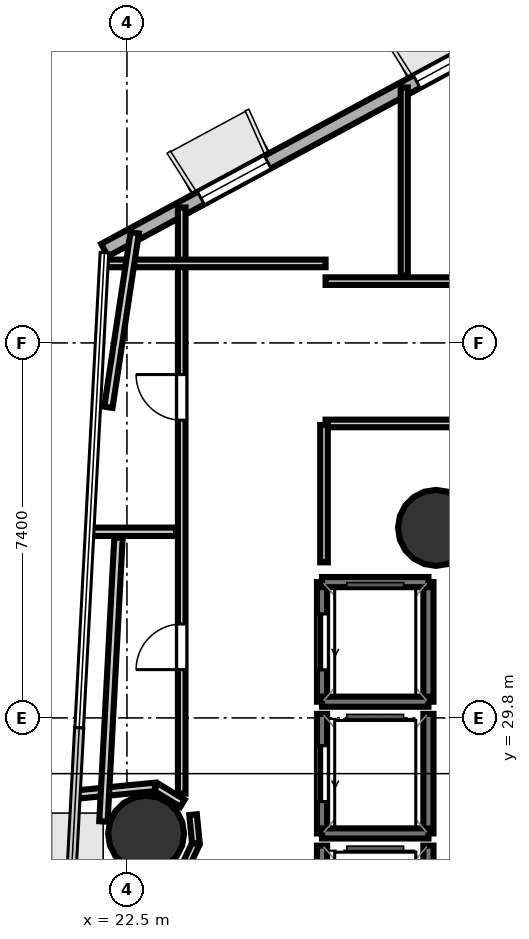
"""IFC4 building model, lengths in metres.
Left out: names, types, materials, properties, quantities, classifications, styles, units other than length and angle.
Written with IfcOpenShell. Run it as: python <this file> out.ifc"""

import sys

from ifc_helpers import new_model, si_unit, direction, frame, frame_2d, origin, origin_2d, place, context, subcontext, project, spatial, rectangle, hollow_circle, extrude, element, fill, save


model = new_model("IFC4")
c1 = context("Model", 3, precision=1e-05, world=origin(), true_north=direction((0.0, 1.0)))
c2 = subcontext(c1, "Body", "Model", "MODEL_VIEW")
j1 = project(units=[si_unit("LENGTHUNIT", "METRE"), si_unit("PLANEANGLEUNIT", "RADIAN")], contexts=[c1])
p1 = place(None, origin())
s1 = spatial("IfcSite", under=j1, at=p1, CompositionType="ELEMENT")
p2 = place(p1, origin())
s2 = spatial("IfcBuilding", under=s1, at=p2, CompositionType="ELEMENT")
p3 = place(p2, frame((0.0, 0.0, 131.1)))
s3 = spatial("IfcBuildingStorey", under=s2, at=p3, CompositionType="ELEMENT", Elevation=131.1)
for number, where, z_axis, x_axis in (
    (1, (28.6, 33.55, 0.0), (0.0, 0.0, 1.0), (1.0, 0.0, 0.0)),
    (2, (22.878, 27.516, 0.0), (0.0, 0.0, 1.0), (1.0, 0.0, 0.0)),
):
    element("IfcColumn", number, at=place(p3, frame(where, z_axis=z_axis, x_axis=x_axis)), inside=s3, PredefinedType="COLUMN", context=c2, shape_type="SweptSolid", body=[
        extrude(hollow_circle(Radius=0.75, WallThickness=0.036, at=origin_2d()), origin(), (0.0, 0.0, 1.0), 3.7),
    ])
p4 = place(p3, frame((30.594, 43.637, 0.0), z_axis=(0.0, 0.0, 1.0), x_axis=(-0.880090959545, -0.474805120999, 0.0)))
e3 = element("IfcWall", 3, at=p4, inside=s3, PredefinedType="SOLIDWALL", context=c2, shape_type="SweptSolid", body=[
    extrude(rectangle(XDim=9.7, YDim=0.28, at=frame_2d((4.85, 0.0))), origin(), (0.0, 0.0, 1.0), 3.52),
])
p5 = place(p4, frame((1.2, 0.0, 0.85)))
e4 = element("IfcOpeningElement", 4, at=p5, cuts=e3, PredefinedType="OPENING", context=c2, shape_type="SweptSolid", body=[
    extrude(rectangle(XDim=1.5, YDim=2.1, at=frame_2d((0.75, 1.05))), frame((0.0, 0.15, 0.0), z_axis=(0.0, -1.0, 0.0), x_axis=(1.0, 0.0, 0.0)), (0.0, 0.0, 1.0), 0.3),
])
p6 = place(p4, frame((6.04, 0.0, 0.85)))
e5 = element("IfcOpeningElement", 5, at=p6, cuts=e3, PredefinedType="OPENING", context=c2, shape_type="SweptSolid", body=[
    extrude(rectangle(XDim=1.5, YDim=2.1, at=frame_2d((0.75, 1.05))), frame((0.0, 0.15, 0.0), z_axis=(0.0, -1.0, 0.0), x_axis=(1.0, 0.0, 0.0)), (0.0, 0.0, 1.0), 0.3),
])
p7 = place(p3, frame((28.45, 30.12, 0.0), z_axis=(0.0, 0.0, 1.0), x_axis=(0.0, 1.0, 0.0)))
e6 = element("IfcWall", 6, at=p7, inside=s3, PredefinedType="SOLIDWALL", context=c2, shape_type="SweptSolid", body=[
    extrude(rectangle(XDim=2.36, YDim=0.2, at=frame_2d((1.18, 0.0))), origin(), (0.0, 0.0, 1.0), 3.52),
])
p8 = place(p3, frame((26.35, 30.12, 0.0), z_axis=(0.0, 0.0, 1.0), x_axis=(0.0, 1.0, 0.0)))
e7 = element("IfcWall", 7, at=p8, inside=s3, PredefinedType="SOLIDWALL", context=c2, shape_type="SweptSolid", body=[
    extrude(rectangle(XDim=2.36, YDim=0.2, at=frame_2d((1.18, 0.0))), origin(), (0.0, 0.0, 1.0), 3.52),
])
p9 = place(p8, frame((0.63, 0.0, 0.0)))
e8 = element("IfcOpeningElement", 8, at=p9, cuts=e7, PredefinedType="OPENING", context=c2, shape_type="SweptSolid", body=[
    extrude(rectangle(XDim=1.1, YDim=2.15, at=frame_2d((0.55, 1.075))), frame((0.0, 0.11, 0.0), z_axis=(0.0, -1.0, 0.0), x_axis=(1.0, 0.0, 0.0)), (0.0, 0.0, 1.0), 0.22),
])
for number, where, z_axis, x_axis in (
    (9, (26.35, 32.48, 0.0), (0.0, 0.0, 1.0), (1.0, 0.0, 0.0)),
    (10, (26.35, 30.12, 0.0), (0.0, 0.0, 1.0), (1.0, 0.0, 0.0)),
):
    element("IfcWall", number, at=place(p3, frame(where, z_axis=z_axis, x_axis=x_axis)), inside=s3, PredefinedType="SOLIDWALL", context=c2, shape_type="SweptSolid", body=[
        extrude(rectangle(XDim=2.1, YDim=0.2, at=frame_2d((1.05, 0.0))), origin(), (0.0, 0.0, 1.0), 3.52),
    ])
p10 = place(p3, frame((28.45, 27.52, 0.0), z_axis=(0.0, 0.0, 1.0), x_axis=(0.0, 1.0, 0.0)))
e11 = element("IfcWall", 11, at=p10, inside=s3, PredefinedType="SOLIDWALL", context=c2, shape_type="SweptSolid", body=[
    extrude(rectangle(XDim=2.36, YDim=0.2, at=frame_2d((1.18, 0.0))), origin(), (0.0, 0.0, 1.0), 3.52),
])
p11 = place(p3, frame((26.35, 27.52, 0.0), z_axis=(0.0, 0.0, 1.0), x_axis=(0.0, 1.0, 0.0)))
e12 = element("IfcWall", 12, at=p11, inside=s3, PredefinedType="SOLIDWALL", context=c2, shape_type="SweptSolid", body=[
    extrude(rectangle(XDim=2.36, YDim=0.2, at=frame_2d((1.18, 0.0))), origin(), (0.0, 0.0, 1.0), 3.52),
])
p12 = place(p11, frame((0.63, 0.0, 0.0)))
e13 = element("IfcOpeningElement", 13, at=p12, cuts=e12, PredefinedType="OPENING", context=c2, shape_type="SweptSolid", body=[
    extrude(rectangle(XDim=1.1, YDim=2.15, at=frame_2d((0.55, 1.075))), frame((0.0, 0.11, 0.0), z_axis=(0.0, -1.0, 0.0), x_axis=(1.0, 0.0, 0.0)), (0.0, 0.0, 1.0), 0.22),
])
p13 = place(p3, frame((26.35, 27.52, 0.0), z_axis=(0.0, 0.0, 1.0), x_axis=(1.0, 0.0, 0.0)))
e14 = element("IfcWall", 14, at=p13, inside=s3, PredefinedType="SOLIDWALL", context=c2, shape_type="SweptSolid", body=[
    extrude(rectangle(XDim=2.1, YDim=0.2, at=frame_2d((1.05, 0.0))), origin(), (0.0, 0.0, 1.0), 3.52),
])
p14 = place(p3, frame((28.45, 24.92, 0.0), z_axis=(0.0, 0.0, 1.0), x_axis=(0.0, 1.0, 0.0)))
e15 = element("IfcWall", 15, at=p14, inside=s3, PredefinedType="SOLIDWALL", context=c2, shape_type="SweptSolid", body=[
    extrude(rectangle(XDim=2.36, YDim=0.2, at=frame_2d((1.18, 0.0))), origin(), (0.0, 0.0, 1.0), 3.52),
])
p15 = place(p3, frame((26.35, 24.92, 0.0), z_axis=(0.0, 0.0, 1.0), x_axis=(0.0, 1.0, 0.0)))
e16 = element("IfcWall", 16, at=p15, inside=s3, PredefinedType="SOLIDWALL", context=c2, shape_type="SweptSolid", body=[
    extrude(rectangle(XDim=2.36, YDim=0.2, at=frame_2d((1.18, 0.0))), origin(), (0.0, 0.0, 1.0), 3.52),
])
p16 = place(p15, frame((0.63, 0.0, 0.0)))
e17 = element("IfcOpeningElement", 17, at=p16, cuts=e16, PredefinedType="OPENING", context=c2, shape_type="SweptSolid", body=[
    extrude(rectangle(XDim=1.1, YDim=2.15, at=frame_2d((0.55, 1.075))), frame((0.0, 0.11, 0.0), z_axis=(0.0, -1.0, 0.0), x_axis=(1.0, 0.0, 0.0)), (0.0, 0.0, 1.0), 0.22),
])
p17 = place(p3, frame((23.581, 28.307, 0.0), z_axis=(0.0, 0.0, 1.0), x_axis=(0.0, 1.0, 0.0)))
e18 = element("IfcWall", 18, at=p17, inside=s3, PredefinedType="PARTITIONING", context=c2, shape_type="SweptSolid", body=[
    extrude(rectangle(XDim=11.567, YDim=0.15, at=frame_2d((5.783, 0.0))), origin(), (0.0, 0.0, 1.0), 2.84),
])
p18 = place(p17, frame((7.369, 0.0, 0.0)))
e19 = element("IfcOpeningElement", 19, at=p18, cuts=e18, PredefinedType="OPENING", context=c2, shape_type="SweptSolid", body=[
    extrude(rectangle(XDim=0.9, YDim=2.1, at=frame_2d((0.45, 1.05))), frame((0.0, 0.085, 0.0), z_axis=(0.0, -1.0, 0.0), x_axis=(1.0, 0.0, 0.0)), (0.0, 0.0, 1.0), 0.17),
])
p19 = place(p17, frame((2.446, 0.0, 0.0)))
e20 = element("IfcOpeningElement", 20, at=p19, cuts=e18, PredefinedType="OPENING", context=c2, shape_type="SweptSolid", body=[
    extrude(rectangle(XDim=0.9, YDim=2.1, at=frame_2d((0.45, 1.05))), frame((0.0, 0.085, 0.0), z_axis=(0.0, -1.0, 0.0), x_axis=(1.0, 0.0, 0.0)), (0.0, 0.0, 1.0), 0.17),
])
p20 = place(p3, frame((22.024, 38.769, 0.0), z_axis=(0.0, 0.0, 1.0), x_axis=(1.0, 0.0, 0.0)))
e21 = element("IfcWall", 21, at=p20, inside=s3, PredefinedType="PARTITIONING", context=c2, shape_type="SweptSolid", body=[
    extrude(rectangle(XDim=4.396, YDim=0.15, at=frame_2d((2.198, 0.0))), origin(), (0.0, 0.0, 1.0), 2.84),
])
p21 = place(p3, frame((26.42, 38.419, 0.0), z_axis=(0.0, 0.0, 1.0), x_axis=(1.0, 0.0, 0.0)))
e22 = element("IfcWall", 22, at=p21, inside=s3, PredefinedType="PARTITIONING", context=c2, shape_type="SweptSolid", body=[
    extrude(rectangle(XDim=14.264, YDim=0.15, at=frame_2d((7.132, 0.0))), origin(), (0.0, 0.0, 1.0), 2.84),
])
p22 = place(p21, frame((6.559, 0.0, 0.0)))
e23 = element("IfcOpeningElement", 23, at=p22, cuts=e22, PredefinedType="OPENING", context=c2, shape_type="SweptSolid", body=[
    extrude(rectangle(XDim=1.25, YDim=2.2, at=frame_2d((0.625, 1.1))), frame((0.0, 0.085, 0.0), z_axis=(0.0, -1.0, 0.0), x_axis=(1.0, 0.0, 0.0)), (0.0, 0.0, 1.0), 0.17),
])
p23 = place(p3, frame((29.7, 35.611, 0.0), z_axis=(0.0, 0.0, 1.0), x_axis=(-1.0, 0.0, 0.0)))
e24 = element("IfcWall", 24, at=p23, inside=s3, PredefinedType="PARTITIONING", context=c2, shape_type="SweptSolid", body=[
    extrude(rectangle(XDim=3.28, YDim=0.15, at=frame_2d((1.64, 0.0))), origin(), (0.0, 0.0, 1.0), 2.84),
])
p24 = place(p3, frame((26.389, 35.58, 0.0), z_axis=(0.0, 0.0, 1.0), x_axis=(0.0, -1.0, 0.0)))
e25 = element("IfcWall", 25, at=p24, inside=s3, PredefinedType="PARTITIONING", context=c2, shape_type="SweptSolid", body=[
    extrude(rectangle(XDim=2.71, YDim=0.15, at=frame_2d((1.355, 0.0))), origin(), (0.0, 0.0, 1.0), 2.84),
])
p25 = place(p3, frame((23.578, 26.712, 0.0), z_axis=(0.0, 0.0, 1.0), x_axis=(0.421251946418, 0.906943657367, 0.0)))
e26 = element("IfcWall", 26, at=p25, inside=s3, PredefinedType="PARTITIONING", context=c2, shape_type="SweptSolid", body=[
    extrude(rectangle(XDim=0.663, YDim=0.15, at=frame_2d((0.332, 0.0))), origin(), (0.0, 0.0, 1.0), 2.84),
])
p26 = place(p3, frame((23.86, 27.33, 0.0), z_axis=(0.0, 0.0, 1.0), x_axis=(-0.098000919071, 0.995186324193, 0.0)))
e27 = element("IfcWall", 27, at=p26, inside=s3, PredefinedType="PARTITIONING", context=c2, shape_type="SweptSolid", body=[
    extrude(rectangle(XDim=0.563, YDim=0.15, at=frame_2d((0.281, 0.0))), origin(), (0.0, 0.0, 1.0), 2.84),
])
p27 = place(p3, frame((27.973, 38.53, 0.0), z_axis=(0.0, 0.0, 1.0), x_axis=(0.0, 1.0, 0.0)))
e28 = element("IfcWall", 28, at=p27, inside=s3, PredefinedType="PARTITIONING", context=c2, shape_type="SweptSolid", body=[
    extrude(rectangle(XDim=3.713, YDim=0.14, at=frame_2d((1.856, 0.0))), origin(), (0.0, 0.0, 1.0), 2.84),
])
p28 = place(p3, frame((23.47, 33.473, 0.0), z_axis=(0.0, 0.0, 1.0), x_axis=(-1.0, 0.0, 0.0)))
e29 = element("IfcWall", 29, at=p28, inside=s3, PredefinedType="PLUMBINGWALL", context=c2, shape_type="SweptSolid", body=[
    extrude(rectangle(XDim=1.727, YDim=0.165, at=frame_2d((0.864, 0.0))), origin(), (0.0, 0.0, 1.0), 2.84),
])
p29 = place(p3, frame((22.134, 35.929, 0.0), z_axis=(0.0, 0.0, 1.0), x_axis=(0.14915308323, 0.988814116891, 0.0)))
e30 = element("IfcWall", 30, at=p29, inside=s3, PredefinedType="PLUMBINGWALL", context=c2, shape_type="SweptSolid", body=[
    extrude(rectangle(XDim=3.482, YDim=0.165, at=frame_2d((1.741, 0.0))), origin(), (0.0, 0.0, 1.0), 2.84),
])
p30 = place(p3, frame((23.595, 28.116, 0.0), z_axis=(0.0, 0.0, 1.0), x_axis=(-0.853675286084, 0.520805631622, 0.0)))
e31 = element("IfcWall", 31, at=p30, inside=s3, PredefinedType="PLUMBINGWALL", context=c2, shape_type="SweptSolid", body=[
    extrude(rectangle(XDim=0.613, YDim=0.165, at=frame_2d((0.307, 0.0))), origin(), (0.0, 0.0, 1.0), 2.84),
])
p31 = place(p3, frame((23.052, 28.439, 0.0), z_axis=(0.0, 0.0, 1.0), x_axis=(-0.995177318494, -0.098092327712, 0.0)))
e32 = element("IfcWall", 32, at=p31, inside=s3, PredefinedType="PLUMBINGWALL", context=c2, shape_type="SweptSolid", body=[
    extrude(rectangle(XDim=1.593, YDim=0.165, at=frame_2d((0.796, 0.0))), origin(), (0.0, 0.0, 1.0), 2.84),
])
p32 = place(p3, frame((22.036, 27.756, 0.0), z_axis=(0.0, 0.0, 1.0), x_axis=(0.053022653613, 0.998593309713, 0.0)))
e33 = element("IfcWall", 33, at=p32, inside=s3, PredefinedType="PLUMBINGWALL", context=c2, shape_type="SweptSolid", body=[
    extrude(rectangle(XDim=5.608, YDim=0.165, at=frame_2d((2.804, 0.0))), origin(), (0.0, 0.0, 1.0), 2.84),
])
p33 = place(p9, origin())
e34 = element("IfcDoor", 34, at=p33, inside=s3, OperationType="SLIDING_TO_LEFT", PredefinedType="DOOR", context=c2, shape_type="SweptSolid", body=[
    extrude(rectangle(XDim=1.1, YDim=2.15, at=frame_2d((0.55, 1.075))), frame((0.0, 0.025, 0.0), z_axis=(0.0, -1.0, 0.0), x_axis=(1.0, 0.0, 0.0)), (0.0, 0.0, 1.0), 0.05),
])
fill(e8, e34)
p34 = place(p12, origin())
e35 = element("IfcDoor", 35, at=p34, inside=s3, OperationType="SLIDING_TO_LEFT", PredefinedType="DOOR", context=c2, shape_type="SweptSolid", body=[
    extrude(rectangle(XDim=1.1, YDim=2.15, at=frame_2d((0.55, 1.075))), frame((0.0, 0.025, 0.0), z_axis=(0.0, -1.0, 0.0), x_axis=(1.0, 0.0, 0.0)), (0.0, 0.0, 1.0), 0.05),
])
fill(e13, e35)
p35 = place(p18, origin())
e36 = element("IfcDoor", 36, at=p35, inside=s3, OperationType="SINGLE_SWING_RIGHT", PredefinedType="DOOR", context=c2, shape_type="SweptSolid", body=[
    extrude(rectangle(XDim=0.9, YDim=2.1, at=frame_2d((0.45, 1.05))), frame((0.0, 0.025, 0.0), z_axis=(0.0, -1.0, 0.0), x_axis=(1.0, 0.0, 0.0)), (0.0, 0.0, 1.0), 0.05),
])
fill(e19, e36)
p36 = place(p19, origin())
e37 = element("IfcDoor", 37, at=p36, inside=s3, OperationType="SINGLE_SWING_LEFT", PredefinedType="DOOR", context=c2, shape_type="SweptSolid", body=[
    extrude(rectangle(XDim=0.9, YDim=2.1, at=frame_2d((0.45, 1.05))), frame((0.0, 0.025, 0.0), z_axis=(0.0, -1.0, 0.0), x_axis=(1.0, 0.0, 0.0)), (0.0, 0.0, 1.0), 0.05),
])
fill(e20, e37)
p37 = place(p5, origin())
e38 = element("IfcWindow", 38, at=p37, inside=s3, PartitioningType="SINGLE_PANEL", PredefinedType="WINDOW", context=c2, shape_type="SweptSolid", body=[
    extrude(rectangle(XDim=1.5, YDim=2.1, at=frame_2d((0.75, 1.05))), frame((0.0, 0.03, 0.0), z_axis=(0.0, -1.0, 0.0), x_axis=(1.0, 0.0, 0.0)), (0.0, 0.0, 1.0), 0.06),
])
fill(e4, e38)
p38 = place(p6, origin())
e39 = element("IfcWindow", 39, at=p38, inside=s3, PartitioningType="SINGLE_PANEL", PredefinedType="WINDOW", context=c2, shape_type="SweptSolid", body=[
    extrude(rectangle(XDim=1.5, YDim=2.1, at=frame_2d((0.75, 1.05))), frame((0.0, 0.03, 0.0), z_axis=(0.0, -1.0, 0.0), x_axis=(1.0, 0.0, 0.0)), (0.0, 0.0, 1.0), 0.06),
])
fill(e5, e39)
save(model, sys.argv[1])
